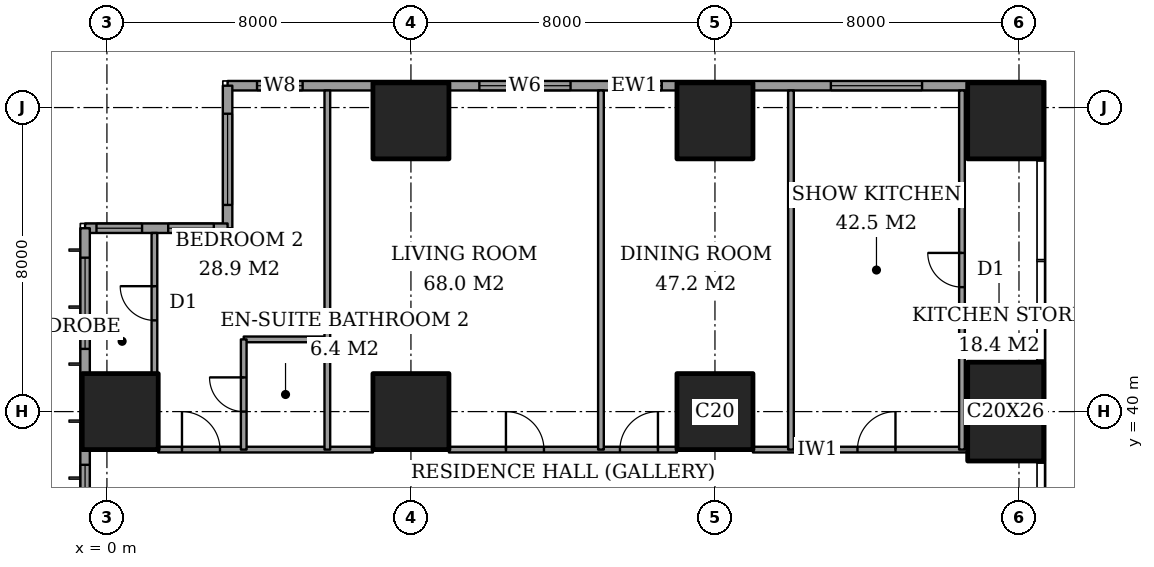
"""IFC4 building model, lengths in metres.
Left out: names, types, materials, properties, quantities, classifications, styles, units other than length and angle.
Written with IfcOpenShell. Run it as: python <this file> out.ifc"""

import sys

from ifc_helpers import new_model, si_unit, direction, frame, frame_2d, origin, origin_2d, place, context, subcontext, project, spatial, rectangle, extrude, element, fill, save


model = new_model("IFC4")
c1 = context("Model", 3, precision=1e-05, world=origin(), true_north=direction((0.0, 1.0)))
c2 = subcontext(c1, "Body", "Model", "MODEL_VIEW")
j1 = project(units=[si_unit("LENGTHUNIT", "METRE"), si_unit("PLANEANGLEUNIT", "RADIAN")], contexts=[c1])
p1 = place(None, origin())
s1 = spatial("IfcSite", under=j1, at=p1, CompositionType="ELEMENT")
p2 = place(p1, origin())
s2 = spatial("IfcBuilding", under=s1, at=p2, CompositionType="ELEMENT")
p3 = place(p2, frame((0.0, 0.0, 33.2)))
s3 = spatial("IfcBuildingStorey", under=s2, at=p3, CompositionType="ELEMENT", Elevation=33.2)
for number, where, z_axis, x_axis in (
    (1, (0.35, 40.0, 0.0), (0.0, 0.0, 1.0), (1.0, 0.0, 0.0)),
    (2, (8.0, 40.0, 0.0), (0.0, 0.0, 1.0), (1.0, 0.0, 0.0)),
    (3, (8.0, 47.65, 0.0), (0.0, 0.0, 1.0), (1.0, 0.0, 0.0)),
    (4, (16.0, 40.0, 0.0), (0.0, 0.0, 1.0), (1.0, 0.0, 0.0)),
    (5, (16.0, 47.65, 0.0), (0.0, 0.0, 1.0), (1.0, 0.0, 0.0)),
):
    element("IfcColumn", number, at=place(p3, frame(where, z_axis=z_axis, x_axis=x_axis)), inside=s3, PredefinedType="COLUMN", context=c2, shape_type="SweptSolid", body=[
        extrude(rectangle(XDim=2.0, YDim=2.0, at=origin_2d()), origin(), (0.0, 0.0, 1.0), 3.6),
    ])
p4 = place(p3, frame((23.65, 40.0, 0.0), z_axis=(0.0, 0.0, 1.0), x_axis=(1.0, 0.0, 0.0)))
e6 = element("IfcColumn", 6, at=p4, inside=s3, PredefinedType="COLUMN", context=c2, shape_type="SweptSolid", body=[
    extrude(rectangle(XDim=2.0, YDim=2.6, at=origin_2d()), origin(), (0.0, 0.0, 1.0), 3.6),
])
p5 = place(p3, frame((23.65, 47.65, 0.0), z_axis=(0.0, 0.0, 1.0), x_axis=(1.0, 0.0, 0.0)))
e7 = element("IfcColumn", 7, at=p5, inside=s3, PredefinedType="COLUMN", context=c2, shape_type="SweptSolid", body=[
    extrude(rectangle(XDim=2.0, YDim=2.0, at=origin_2d()), origin(), (0.0, 0.0, 1.0), 3.6),
])
p6 = place(p3, frame((24.575, 48.575, 0.0), z_axis=(0.0, 0.0, 1.0), x_axis=(-1.0, 0.0, 0.0)))
e8 = element("IfcWall", 8, at=p6, inside=s3, PredefinedType="SOLIDWALL", context=c2, shape_type="SweptSolid", body=[
    extrude(rectangle(XDim=21.4, YDim=0.25, at=frame_2d((10.7, 0.0))), origin(), (0.0, 0.0, 1.0), 3.6),
])
p7 = place(p6, frame((3.125, 0.0, 0.6)))
e9 = element("IfcOpeningElement", 9, at=p7, cuts=e8, PredefinedType="OPENING", context=c2, shape_type="SweptSolid", body=[
    extrude(rectangle(XDim=2.4, YDim=2.0, at=frame_2d((1.2, 1.0))), frame((0.0, 0.135, 0.0), z_axis=(0.0, -1.0, 0.0), x_axis=(1.0, 0.0, 0.0)), (0.0, 0.0, 1.0), 0.27),
])
p8 = place(p6, frame((9.975, 0.0, 0.6)))
e10 = element("IfcOpeningElement", 10, at=p8, cuts=e8, PredefinedType="OPENING", context=c2, shape_type="SweptSolid", body=[
    extrude(rectangle(XDim=1.2, YDim=2.0, at=frame_2d((0.6, 1.0))), frame((0.0, 0.135, 0.0), z_axis=(0.0, -1.0, 0.0), x_axis=(1.0, 0.0, 0.0)), (0.0, 0.0, 1.0), 0.27),
])
p9 = place(p6, frame((12.375, 0.0, 0.6)))
e11 = element("IfcOpeningElement", 11, at=p9, cuts=e8, PredefinedType="OPENING", context=c2, shape_type="SweptSolid", body=[
    extrude(rectangle(XDim=2.4, YDim=2.0, at=frame_2d((1.2, 1.0))), frame((0.0, 0.135, 0.0), z_axis=(0.0, -1.0, 0.0), x_axis=(1.0, 0.0, 0.0)), (0.0, 0.0, 1.0), 0.27),
])
p10 = place(p6, frame((19.425, 0.0, 0.6)))
e12 = element("IfcOpeningElement", 12, at=p10, cuts=e8, PredefinedType="OPENING", context=c2, shape_type="SweptSolid", body=[
    extrude(rectangle(XDim=1.2, YDim=2.0, at=frame_2d((0.6, 1.0))), frame((0.0, 0.135, 0.0), z_axis=(0.0, -1.0, 0.0), x_axis=(1.0, 0.0, 0.0)), (0.0, 0.0, 1.0), 0.27),
])
p11 = place(p3, frame((3.175, 48.575, 0.0), z_axis=(0.0, 0.0, 1.0), x_axis=(0.0, -1.0, 0.0)))
e13 = element("IfcWall", 13, at=p11, inside=s3, PredefinedType="SOLIDWALL", context=c2, shape_type="SweptSolid", body=[
    extrude(rectangle(XDim=3.75, YDim=0.25, at=frame_2d((1.875, 0.0))), origin(), (0.0, 0.0, 1.0), 3.6),
])
p12 = place(p11, frame((0.738, 0.0, 0.6)))
e14 = element("IfcOpeningElement", 14, at=p12, cuts=e13, PredefinedType="OPENING", context=c2, shape_type="SweptSolid", body=[
    extrude(rectangle(XDim=2.4, YDim=2.0, at=frame_2d((1.2, 1.0))), frame((0.0, 0.135, 0.0), z_axis=(0.0, -1.0, 0.0), x_axis=(1.0, 0.0, 0.0)), (0.0, 0.0, 1.0), 0.27),
])
p13 = place(p3, frame((3.175, 44.825, 0.0), z_axis=(0.0, 0.0, 1.0), x_axis=(-1.0, 0.0, 0.0)))
e15 = element("IfcWall", 15, at=p13, inside=s3, PredefinedType="SOLIDWALL", context=c2, shape_type="SweptSolid", body=[
    extrude(rectangle(XDim=3.75, YDim=0.25, at=frame_2d((1.875, 0.0))), origin(), (0.0, 0.0, 1.0), 3.6),
])
p14 = place(p13, frame((0.363, 0.0, 0.6)))
e16 = element("IfcOpeningElement", 16, at=p14, cuts=e15, PredefinedType="OPENING", context=c2, shape_type="SweptSolid", body=[
    extrude(rectangle(XDim=1.2, YDim=2.0, at=frame_2d((0.6, 1.0))), frame((0.0, 0.135, 0.0), z_axis=(0.0, -1.0, 0.0), x_axis=(1.0, 0.0, 0.0)), (0.0, 0.0, 1.0), 0.27),
])
p15 = place(p13, frame((2.25, 0.0, 0.6)))
e17 = element("IfcOpeningElement", 17, at=p15, cuts=e15, PredefinedType="OPENING", context=c2, shape_type="SweptSolid", body=[
    extrude(rectangle(XDim=1.2, YDim=2.0, at=frame_2d((0.6, 1.0))), frame((0.0, 0.135, 0.0), z_axis=(0.0, -1.0, 0.0), x_axis=(1.0, 0.0, 0.0)), (0.0, 0.0, 1.0), 0.27),
])
p16 = place(p3, frame((-0.575, 44.825, 0.0), z_axis=(0.0, 0.0, 1.0), x_axis=(0.0, -1.0, 0.0)))
e18 = element("IfcWall", 18, at=p16, inside=s3, PredefinedType="SOLIDWALL", context=c2, shape_type="SweptSolid", body=[
    extrude(rectangle(XDim=41.65, YDim=0.25, at=frame_2d((20.825, 0.0))), origin(), (0.0, 0.0, 1.0), 3.6),
])
p17 = place(p16, frame((0.775, 0.0, 0.6)))
e19 = element("IfcOpeningElement", 19, at=p17, cuts=e18, PredefinedType="OPENING", context=c2, shape_type="SweptSolid", body=[
    extrude(rectangle(XDim=2.4, YDim=2.0, at=frame_2d((1.2, 1.0))), frame((0.0, 0.135, 0.0), z_axis=(0.0, -1.0, 0.0), x_axis=(1.0, 0.0, 0.0)), (0.0, 0.0, 1.0), 0.27),
])
p18 = place(p16, frame((6.225, 0.0, 0.6)))
e20 = element("IfcOpeningElement", 20, at=p18, cuts=e18, PredefinedType="OPENING", context=c2, shape_type="SweptSolid", body=[
    extrude(rectangle(XDim=1.2, YDim=2.0, at=frame_2d((0.6, 1.0))), frame((0.0, 0.135, 0.0), z_axis=(0.0, -1.0, 0.0), x_axis=(1.0, 0.0, 0.0)), (0.0, 0.0, 1.0), 0.27),
])
p19 = place(p16, frame((8.625, 0.0, 0.6)))
e21 = element("IfcOpeningElement", 21, at=p19, cuts=e18, PredefinedType="OPENING", context=c2, shape_type="SweptSolid", body=[
    extrude(rectangle(XDim=2.4, YDim=2.0, at=frame_2d((1.2, 1.0))), frame((0.0, 0.135, 0.0), z_axis=(0.0, -1.0, 0.0), x_axis=(1.0, 0.0, 0.0)), (0.0, 0.0, 1.0), 0.27),
])
p20 = place(p16, frame((15.625, 0.0, 0.6)))
e22 = element("IfcOpeningElement", 22, at=p20, cuts=e18, PredefinedType="OPENING", context=c2, shape_type="SweptSolid", body=[
    extrude(rectangle(XDim=2.4, YDim=2.0, at=frame_2d((1.2, 1.0))), frame((0.0, 0.135, 0.0), z_axis=(0.0, -1.0, 0.0), x_axis=(1.0, 0.0, 0.0)), (0.0, 0.0, 1.0), 0.27),
])
p21 = place(p16, frame((23.625, 0.0, 0.6)))
e23 = element("IfcOpeningElement", 23, at=p21, cuts=e18, PredefinedType="OPENING", context=c2, shape_type="SweptSolid", body=[
    extrude(rectangle(XDim=2.4, YDim=2.0, at=frame_2d((1.2, 1.0))), frame((0.0, 0.135, 0.0), z_axis=(0.0, -1.0, 0.0), x_axis=(1.0, 0.0, 0.0)), (0.0, 0.0, 1.0), 0.27),
])
p22 = place(p16, frame((30.825, 0.0, 0.6)))
e24 = element("IfcOpeningElement", 24, at=p22, cuts=e18, PredefinedType="OPENING", context=c2, shape_type="SweptSolid", body=[
    extrude(rectangle(XDim=2.4, YDim=2.0, at=frame_2d((1.2, 1.0))), frame((0.0, 0.135, 0.0), z_axis=(0.0, -1.0, 0.0), x_axis=(1.0, 0.0, 0.0)), (0.0, 0.0, 1.0), 0.27),
])
p23 = place(p16, frame((34.5, 0.0, 0.6)))
e25 = element("IfcOpeningElement", 25, at=p23, cuts=e18, PredefinedType="OPENING", context=c2, shape_type="SweptSolid", body=[
    extrude(rectangle(XDim=1.2, YDim=2.0, at=frame_2d((0.6, 1.0))), frame((0.0, 0.135, 0.0), z_axis=(0.0, -1.0, 0.0), x_axis=(1.0, 0.0, 0.0)), (0.0, 0.0, 1.0), 0.27),
])
p24 = place(p16, frame((38.475, 0.0, 0.6)))
e26 = element("IfcOpeningElement", 26, at=p24, cuts=e18, PredefinedType="OPENING", context=c2, shape_type="SweptSolid", body=[
    extrude(rectangle(XDim=2.4, YDim=2.0, at=frame_2d((1.2, 1.0))), frame((0.0, 0.135, 0.0), z_axis=(0.0, -1.0, 0.0), x_axis=(1.0, 0.0, 0.0)), (0.0, 0.0, 1.0), 0.27),
])
p25 = place(p3, frame((1.35, 39.0, 0.0), z_axis=(0.0, 0.0, 1.0), x_axis=(1.0, 0.0, 0.0)))
e27 = element("IfcWall", 27, at=p25, inside=s3, PredefinedType="PARTITIONING", context=c2, shape_type="SweptSolid", body=[
    extrude(rectangle(XDim=5.65, YDim=0.15, at=frame_2d((2.825, 0.0))), origin(), (0.0, 0.0, 1.0), 3.35),
])
p26 = place(p25, frame((0.625, 0.0, 0.0)))
e28 = element("IfcOpeningElement", 28, at=p26, cuts=e27, PredefinedType="OPENING", context=c2, shape_type="SweptSolid", body=[
    extrude(rectangle(XDim=1.0, YDim=2.1, at=frame_2d((0.5, 1.05))), frame((0.0, 0.085, 0.0), z_axis=(0.0, -1.0, 0.0), x_axis=(1.0, 0.0, 0.0)), (0.0, 0.0, 1.0), 0.17),
])
p27 = place(p3, frame((9.0, 39.0, 0.0), z_axis=(0.0, 0.0, 1.0), x_axis=(1.0, 0.0, 0.0)))
e29 = element("IfcWall", 29, at=p27, inside=s3, PredefinedType="PARTITIONING", context=c2, shape_type="SweptSolid", body=[
    extrude(rectangle(XDim=6.0, YDim=0.15, at=frame_2d((3.0, 0.0))), origin(), (0.0, 0.0, 1.0), 3.35),
])
p28 = place(p27, frame((1.5, 0.0, 0.0)))
e30 = element("IfcOpeningElement", 30, at=p28, cuts=e29, PredefinedType="OPENING", context=c2, shape_type="SweptSolid", body=[
    extrude(rectangle(XDim=1.0, YDim=2.1, at=frame_2d((0.5, 1.05))), frame((0.0, 0.085, 0.0), z_axis=(0.0, -1.0, 0.0), x_axis=(1.0, 0.0, 0.0)), (0.0, 0.0, 1.0), 0.17),
])
p29 = place(p27, frame((4.5, 0.0, 0.0)))
e31 = element("IfcOpeningElement", 31, at=p29, cuts=e29, PredefinedType="OPENING", context=c2, shape_type="SweptSolid", body=[
    extrude(rectangle(XDim=1.0, YDim=2.1, at=frame_2d((0.5, 1.05))), frame((0.0, 0.085, 0.0), z_axis=(0.0, -1.0, 0.0), x_axis=(1.0, 0.0, 0.0)), (0.0, 0.0, 1.0), 0.17),
])
p30 = place(p3, frame((17.0, 39.0, 0.0), z_axis=(0.0, 0.0, 1.0), x_axis=(1.0, 0.0, 0.0)))
e32 = element("IfcWall", 32, at=p30, inside=s3, PredefinedType="PARTITIONING", context=c2, shape_type="SweptSolid", body=[
    extrude(rectangle(XDim=5.65, YDim=0.15, at=frame_2d((2.825, 0.0))), origin(), (0.0, 0.0, 1.0), 3.35),
])
p31 = place(p30, frame((2.75, 0.0, 0.0)))
e33 = element("IfcOpeningElement", 33, at=p31, cuts=e32, PredefinedType="OPENING", context=c2, shape_type="SweptSolid", body=[
    extrude(rectangle(XDim=1.0, YDim=2.1, at=frame_2d((0.5, 1.05))), frame((0.0, 0.085, 0.0), z_axis=(0.0, -1.0, 0.0), x_axis=(1.0, 0.0, 0.0)), (0.0, 0.0, 1.0), 0.17),
])
p32 = place(p3, frame((3.6, 41.9, 0.0), z_axis=(0.0, 0.0, 1.0), x_axis=(1.0, 0.0, 0.0)))
e34 = element("IfcWall", 34, at=p32, inside=s3, PredefinedType="PARTITIONING", context=c2, shape_type="SweptSolid", body=[
    extrude(rectangle(XDim=2.2, YDim=0.15, at=frame_2d((1.1, 0.0))), origin(), (0.0, 0.0, 1.0), 3.35),
])
p33 = place(p3, frame((1.25, 41.0, 0.0), z_axis=(0.0, 0.0, 1.0), x_axis=(0.0, 1.0, 0.0)))
e35 = element("IfcWall", 35, at=p33, inside=s3, PredefinedType="PARTITIONING", context=c2, shape_type="SweptSolid", body=[
    extrude(rectangle(XDim=3.7, YDim=0.15, at=frame_2d((1.85, 0.0))), origin(), (0.0, 0.0, 1.0), 3.35),
])
p34 = place(p33, frame((1.4, 0.0, 0.0)))
e36 = element("IfcOpeningElement", 36, at=p34, cuts=e35, PredefinedType="OPENING", context=c2, shape_type="SweptSolid", body=[
    extrude(rectangle(XDim=0.9, YDim=2.1, at=frame_2d((0.45, 1.05))), frame((0.0, 0.085, 0.0), z_axis=(0.0, -1.0, 0.0), x_axis=(1.0, 0.0, 0.0)), (0.0, 0.0, 1.0), 0.17),
])
p35 = place(p3, frame((3.6, 39.0, 0.0), z_axis=(0.0, 0.0, 1.0), x_axis=(0.0, 1.0, 0.0)))
e37 = element("IfcWall", 37, at=p35, inside=s3, PredefinedType="PARTITIONING", context=c2, shape_type="SweptSolid", body=[
    extrude(rectangle(XDim=2.9, YDim=0.15, at=frame_2d((1.45, 0.0))), origin(), (0.0, 0.0, 1.0), 3.35),
])
p36 = place(p35, frame((1.0, 0.0, 0.0)))
e38 = element("IfcOpeningElement", 38, at=p36, cuts=e37, PredefinedType="OPENING", context=c2, shape_type="SweptSolid", body=[
    extrude(rectangle(XDim=0.9, YDim=2.1, at=frame_2d((0.45, 1.05))), frame((0.0, 0.085, 0.0), z_axis=(0.0, -1.0, 0.0), x_axis=(1.0, 0.0, 0.0)), (0.0, 0.0, 1.0), 0.17),
])
for number, where, z_axis, x_axis in (
    (39, (5.8, 39.0, 0.0), (0.0, 0.0, 1.0), (0.0, 1.0, 0.0)),
    (40, (13.0, 39.0, 0.0), (0.0, 0.0, 1.0), (0.0, 1.0, 0.0)),
    (41, (18.0, 39.0, 0.0), (0.0, 0.0, 1.0), (0.0, 1.0, 0.0)),
):
    element("IfcWall", number, at=place(p3, frame(where, z_axis=z_axis, x_axis=x_axis)), inside=s3, PredefinedType="PARTITIONING", context=c2, shape_type="SweptSolid", body=[
        extrude(rectangle(XDim=9.45, YDim=0.15, at=frame_2d((4.725, 0.0))), origin(), (0.0, 0.0, 1.0), 3.35),
    ])
p37 = place(p3, frame((22.5, 39.0, 0.0), z_axis=(0.0, 0.0, 1.0), x_axis=(0.0, 1.0, 0.0)))
e42 = element("IfcWall", 42, at=p37, inside=s3, PredefinedType="PARTITIONING", context=c2, shape_type="SweptSolid", body=[
    extrude(rectangle(XDim=9.45, YDim=0.15, at=frame_2d((4.725, 0.0))), origin(), (0.0, 0.0, 1.0), 3.35),
])
p38 = place(p37, frame((4.275, 0.0, 0.0)))
e43 = element("IfcOpeningElement", 43, at=p38, cuts=e42, PredefinedType="OPENING", context=c2, shape_type="SweptSolid", body=[
    extrude(rectangle(XDim=0.9, YDim=2.1, at=frame_2d((0.45, 1.05))), frame((0.0, 0.085, 0.0), z_axis=(0.0, -1.0, 0.0), x_axis=(1.0, 0.0, 0.0)), (0.0, 0.0, 1.0), 0.17),
])
p39 = place(p7, origin())
e44 = element("IfcWindow", 44, at=p39, inside=s3, PartitioningType="SINGLE_PANEL", PredefinedType="WINDOW", context=c2, shape_type="SweptSolid", body=[
    extrude(rectangle(XDim=2.4, YDim=2.0, at=frame_2d((1.2, 1.0))), frame((0.0, 0.03, 0.0), z_axis=(0.0, -1.0, 0.0), x_axis=(1.0, 0.0, 0.0)), (0.0, 0.0, 1.0), 0.06),
])
fill(e9, e44)
p40 = place(p8, origin())
e45 = element("IfcWindow", 45, at=p40, inside=s3, PartitioningType="SINGLE_PANEL", PredefinedType="WINDOW", context=c2, shape_type="SweptSolid", body=[
    extrude(rectangle(XDim=1.2, YDim=2.0, at=frame_2d((0.6, 1.0))), frame((0.0, 0.03, 0.0), z_axis=(0.0, -1.0, 0.0), x_axis=(1.0, 0.0, 0.0)), (0.0, 0.0, 1.0), 0.06),
])
fill(e10, e45)
p41 = place(p9, origin())
e46 = element("IfcWindow", 46, at=p41, inside=s3, PartitioningType="SINGLE_PANEL", PredefinedType="WINDOW", context=c2, shape_type="SweptSolid", body=[
    extrude(rectangle(XDim=2.4, YDim=2.0, at=frame_2d((1.2, 1.0))), frame((0.0, 0.03, 0.0), z_axis=(0.0, -1.0, 0.0), x_axis=(1.0, 0.0, 0.0)), (0.0, 0.0, 1.0), 0.06),
])
fill(e11, e46)
p42 = place(p10, origin())
e47 = element("IfcWindow", 47, at=p42, inside=s3, PartitioningType="SINGLE_PANEL", PredefinedType="WINDOW", context=c2, shape_type="SweptSolid", body=[
    extrude(rectangle(XDim=1.2, YDim=2.0, at=frame_2d((0.6, 1.0))), frame((0.0, 0.03, 0.0), z_axis=(0.0, -1.0, 0.0), x_axis=(1.0, 0.0, 0.0)), (0.0, 0.0, 1.0), 0.06),
])
fill(e12, e47)
p43 = place(p12, origin())
e48 = element("IfcWindow", 48, at=p43, inside=s3, PartitioningType="SINGLE_PANEL", PredefinedType="WINDOW", context=c2, shape_type="SweptSolid", body=[
    extrude(rectangle(XDim=2.4, YDim=2.0, at=frame_2d((1.2, 1.0))), frame((0.0, 0.03, 0.0), z_axis=(0.0, -1.0, 0.0), x_axis=(1.0, 0.0, 0.0)), (0.0, 0.0, 1.0), 0.06),
])
fill(e14, e48)
p44 = place(p14, origin())
e49 = element("IfcWindow", 49, at=p44, inside=s3, PartitioningType="SINGLE_PANEL", PredefinedType="WINDOW", context=c2, shape_type="SweptSolid", body=[
    extrude(rectangle(XDim=1.2, YDim=2.0, at=frame_2d((0.6, 1.0))), frame((0.0, 0.03, 0.0), z_axis=(0.0, -1.0, 0.0), x_axis=(1.0, 0.0, 0.0)), (0.0, 0.0, 1.0), 0.06),
])
fill(e16, e49)
p45 = place(p15, origin())
e50 = element("IfcWindow", 50, at=p45, inside=s3, PartitioningType="SINGLE_PANEL", PredefinedType="WINDOW", context=c2, shape_type="SweptSolid", body=[
    extrude(rectangle(XDim=1.2, YDim=2.0, at=frame_2d((0.6, 1.0))), frame((0.0, 0.03, 0.0), z_axis=(0.0, -1.0, 0.0), x_axis=(1.0, 0.0, 0.0)), (0.0, 0.0, 1.0), 0.06),
])
fill(e17, e50)
p46 = place(p17, origin())
e51 = element("IfcWindow", 51, at=p46, inside=s3, PartitioningType="SINGLE_PANEL", PredefinedType="WINDOW", context=c2, shape_type="SweptSolid", body=[
    extrude(rectangle(XDim=2.4, YDim=2.0, at=frame_2d((1.2, 1.0))), frame((0.0, 0.03, 0.0), z_axis=(0.0, -1.0, 0.0), x_axis=(1.0, 0.0, 0.0)), (0.0, 0.0, 1.0), 0.06),
])
fill(e19, e51)
p47 = place(p18, origin())
e52 = element("IfcWindow", 52, at=p47, inside=s3, PartitioningType="SINGLE_PANEL", PredefinedType="WINDOW", context=c2, shape_type="SweptSolid", body=[
    extrude(rectangle(XDim=1.2, YDim=2.0, at=frame_2d((0.6, 1.0))), frame((0.0, 0.03, 0.0), z_axis=(0.0, -1.0, 0.0), x_axis=(1.0, 0.0, 0.0)), (0.0, 0.0, 1.0), 0.06),
])
fill(e20, e52)
p48 = place(p34, origin())
e53 = element("IfcDoor", 53, at=p48, inside=s3, OperationType="SINGLE_SWING_LEFT", PredefinedType="DOOR", context=c2, shape_type="SweptSolid", body=[
    extrude(rectangle(XDim=0.9, YDim=2.1, at=frame_2d((0.45, 1.05))), frame((0.0, 0.025, 0.0), z_axis=(0.0, -1.0, 0.0), x_axis=(1.0, 0.0, 0.0)), (0.0, 0.0, 1.0), 0.05),
])
fill(e36, e53)
p49 = place(p36, origin())
e54 = element("IfcDoor", 54, at=p49, inside=s3, OperationType="SINGLE_SWING_LEFT", PredefinedType="DOOR", context=c2, shape_type="SweptSolid", body=[
    extrude(rectangle(XDim=0.9, YDim=2.1, at=frame_2d((0.45, 1.05))), frame((0.0, 0.025, 0.0), z_axis=(0.0, -1.0, 0.0), x_axis=(1.0, 0.0, 0.0)), (0.0, 0.0, 1.0), 0.05),
])
fill(e38, e54)
p50 = place(p26, origin())
e55 = element("IfcDoor", 55, at=p50, inside=s3, OperationType="SINGLE_SWING_RIGHT", PredefinedType="DOOR", context=c2, shape_type="SweptSolid", body=[
    extrude(rectangle(XDim=1.0, YDim=2.1, at=frame_2d((0.5, 1.05))), frame((0.0, 0.025, 0.0), z_axis=(0.0, -1.0, 0.0), x_axis=(1.0, 0.0, 0.0)), (0.0, 0.0, 1.0), 0.05),
])
fill(e28, e55)
p51 = place(p28, origin())
e56 = element("IfcDoor", 56, at=p51, inside=s3, OperationType="SINGLE_SWING_RIGHT", PredefinedType="DOOR", context=c2, shape_type="SweptSolid", body=[
    extrude(rectangle(XDim=1.0, YDim=2.1, at=frame_2d((0.5, 1.05))), frame((0.0, 0.025, 0.0), z_axis=(0.0, -1.0, 0.0), x_axis=(1.0, 0.0, 0.0)), (0.0, 0.0, 1.0), 0.05),
])
fill(e30, e56)
p52 = place(p29, origin())
e57 = element("IfcDoor", 57, at=p52, inside=s3, OperationType="SINGLE_SWING_LEFT", PredefinedType="DOOR", context=c2, shape_type="SweptSolid", body=[
    extrude(rectangle(XDim=1.0, YDim=2.1, at=frame_2d((0.5, 1.05))), frame((0.0, 0.025, 0.0), z_axis=(0.0, -1.0, 0.0), x_axis=(1.0, 0.0, 0.0)), (0.0, 0.0, 1.0), 0.05),
])
fill(e31, e57)
p53 = place(p31, origin())
e58 = element("IfcDoor", 58, at=p53, inside=s3, OperationType="SINGLE_SWING_LEFT", PredefinedType="DOOR", context=c2, shape_type="SweptSolid", body=[
    extrude(rectangle(XDim=1.0, YDim=2.1, at=frame_2d((0.5, 1.05))), frame((0.0, 0.025, 0.0), z_axis=(0.0, -1.0, 0.0), x_axis=(1.0, 0.0, 0.0)), (0.0, 0.0, 1.0), 0.05),
])
fill(e33, e58)
p54 = place(p38, origin())
e59 = element("IfcDoor", 59, at=p54, inside=s3, OperationType="SINGLE_SWING_LEFT", PredefinedType="DOOR", context=c2, shape_type="SweptSolid", body=[
    extrude(rectangle(XDim=0.9, YDim=2.1, at=frame_2d((0.45, 1.05))), frame((0.0, 0.025, 0.0), z_axis=(0.0, -1.0, 0.0), x_axis=(1.0, 0.0, 0.0)), (0.0, 0.0, 1.0), 0.05),
])
fill(e43, e59)
save(model, sys.argv[1])
